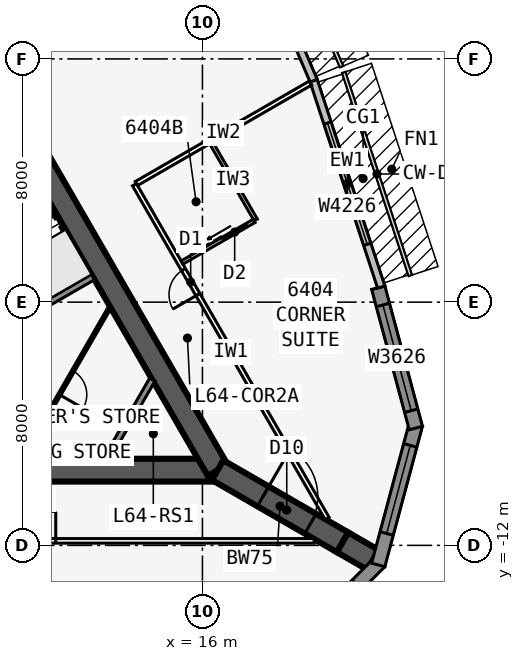
"""IFC4 building model, lengths in metres.
Left out: names, types, materials, properties, quantities, classifications, styles, units other than length and angle.
Written with IfcOpenShell. Run it as: python <this file> out.ifc"""

import sys

from ifc_helpers import new_model, si_unit, direction, frame, frame_2d, origin, place, context, subcontext, project, spatial, polyline, rectangle, outline, extrude, element, fill, save


model = new_model("IFC4")
c1 = context("Model", 3, precision=1e-05, world=origin(), true_north=direction((0.0, 1.0)))
c2 = subcontext(c1, "Body", "Model", "MODEL_VIEW")
j1 = project(units=[si_unit("LENGTHUNIT", "METRE"), si_unit("PLANEANGLEUNIT", "RADIAN")], contexts=[c1])
p1 = place(None, origin())
s1 = spatial("IfcSite", under=j1, at=p1, CompositionType="ELEMENT")
p2 = place(p1, origin())
s2 = spatial("IfcBuilding", under=s1, at=p2, CompositionType="ELEMENT")
p3 = place(p2, frame((0.0, 0.0, 242.9)))
s3 = spatial("IfcBuildingStorey", under=s2, at=p3, CompositionType="ELEMENT", Elevation=242.9)
p4 = place(p3, frame((-16.5, -9.526, 0.0), z_axis=(0.0, 0.0, 1.0), x_axis=(1.0, 0.0, 0.0)))
e1 = element("IfcWall", 1, at=p4, inside=s3, PredefinedType="SHEAR", context=c2, shape_type="SweptSolid", body=[
    extrude(rectangle(XDim=33.0, YDim=0.75, at=frame_2d((16.5, 0.0))), origin(), (0.0, 0.0, 1.0), 3.6),
])
p5 = place(p4, frame((14.05, 0.0, 0.0)))
e2 = element("IfcOpeningElement", 2, at=p5, cuts=e1, PredefinedType="OPENING", context=c2, shape_type="SweptSolid", body=[
    extrude(rectangle(XDim=1.8, YDim=2.13, at=frame_2d((0.9, 1.065))), frame((0.0, 0.385, 0.0), z_axis=(0.0, -1.0, 0.0), x_axis=(1.0, 0.0, 0.0)), (0.0, 0.0, 1.0), 0.77),
])
p6 = place(p3, frame((16.5, -9.526, 0.0), z_axis=(0.0, 0.0, 1.0), x_axis=(-0.499999749417, 0.866025548458, 0.0)))
e3 = element("IfcWall", 3, at=p6, inside=s3, PredefinedType="SHEAR", context=c2, shape_type="SweptSolid", body=[
    extrude(rectangle(XDim=33.0, YDim=0.75, at=frame_2d((16.5, 0.0))), origin(), (0.0, 0.0, 1.0), 3.6),
])
p7 = place(p6, frame((14.15, 0.0, 0.0)))
e4 = element("IfcOpeningElement", 4, at=p7, cuts=e3, PredefinedType="OPENING", context=c2, shape_type="SweptSolid", body=[
    extrude(rectangle(XDim=1.8, YDim=2.13, at=frame_2d((0.9, 1.065))), frame((0.0, 0.385, 0.0), z_axis=(0.0, -1.0, 0.0), x_axis=(1.0, 0.0, 0.0)), (0.0, 0.0, 1.0), 0.77),
])
p8 = place(p6, frame((12.6, 0.0, 0.0)))
e5 = element("IfcOpeningElement", 5, at=p8, cuts=e3, PredefinedType="OPENING", context=c2, shape_type="SweptSolid", body=[
    extrude(rectangle(XDim=1.0, YDim=2.13, at=frame_2d((0.5, 1.065))), frame((0.0, 0.385, 0.0), z_axis=(0.0, -1.0, 0.0), x_axis=(1.0, 0.0, 0.0)), (0.0, 0.0, 1.0), 0.77),
])
p9 = place(p3, frame((9.629, -4.775, 0.0), z_axis=(0.0, 0.0, 1.0), x_axis=(0.866008981251, 0.500028443584, 0.0)))
e6 = element("IfcWall", 6, at=p9, inside=s3, PredefinedType="SOLIDWALL", context=c2, shape_type="SweptSolid", body=[
    extrude(rectangle(XDim=3.2, YDim=0.2, at=frame_2d((1.6, 0.0))), origin(), (0.0, 0.0, 1.0), 3.435),
])
p10 = place(p3, frame((16.5, -9.526, 0.0), z_axis=(0.0, 0.0, 1.0), x_axis=(0.866031398331, -0.499989616998, 0.0)))
e7 = element("IfcWall", 7, at=p10, inside=s3, PredefinedType="SHEAR", context=c2, shape_type="SweptSolid", body=[
    extrude(rectangle(XDim=4.746, YDim=0.75, at=frame_2d((2.373, 0.0))), origin(), (0.0, 0.0, 1.0), 3.6),
])
p11 = place(p10, frame((1.725, 0.0, 0.0)))
e8 = element("IfcOpeningElement", 8, at=p11, cuts=e7, PredefinedType="OPENING", context=c2, shape_type="SweptSolid", body=[
    extrude(rectangle(XDim=1.8, YDim=2.13, at=frame_2d((0.9, 1.065))), frame((0.0, 0.385, 0.0), z_axis=(0.0, -1.0, 0.0), x_axis=(1.0, 0.0, 0.0)), (0.0, 0.0, 1.0), 0.77),
])
p12 = place(p3, frame((20.61, -11.899, 0.0), z_axis=(0.0, 0.0, 1.0), x_axis=(0.866009537788, -0.500027479704, 0.0)))
e9 = element("IfcWall", 9, at=p12, inside=s3, PredefinedType="SHEAR", context=c2, shape_type="SweptSolid", body=[
    extrude(rectangle(XDim=1.155, YDim=0.75, at=frame_2d((0.577, 0.0))), origin(), (0.0, 0.0, 1.0), 3.6),
])
p13 = place(p3, frame((18.46, -15.924, 0.0), z_axis=(0.0, 0.0, 1.0), x_axis=(0.707081252484, 0.707132308968, 0.0)))
e10 = element("IfcWall", 10, at=p13, inside=s3, PredefinedType="SOLIDWALL", context=c2, shape_type="SweptSolid", body=[
    extrude(outline(polyline([(4.782, 0.225), (4.723, 0.225), (4.303, 0.113), (4.273, 0.225), (0.0, 0.225), (0.0, -0.225), (4.782, -0.225), (4.782, 0.225)])), origin(), (0.0, 0.0, 1.0), 3.435),
])
p14 = place(p13, frame((0.711, 0.0, 0.45)))
e11 = element("IfcOpeningElement", 11, at=p14, cuts=e10, PredefinedType="OPENING", context=c2, shape_type="SweptSolid", body=[
    extrude(rectangle(XDim=3.0, YDim=2.6, at=frame_2d((1.5, 1.3))), frame((0.0, 0.235, 0.0), z_axis=(0.0, -1.0, 0.0), x_axis=(1.0, 0.0, 0.0)), (0.0, 0.0, 1.0), 0.47),
])
p15 = place(p3, frame((21.783, -12.644, 0.0), z_axis=(0.0, 0.0, 1.0), x_axis=(0.25880328844, 0.965930048136, 0.0)))
e12 = element("IfcWall", 12, at=p15, inside=s3, PredefinedType="SOLIDWALL", context=c2, shape_type="SweptSolid", body=[
    extrude(outline(polyline([(4.782, 0.225), (0.509, 0.225), (0.479, 0.113), (0.06, 0.225), (0.0, 0.225), (0.0, -0.225), (4.782, -0.225), (4.782, 0.225)])), origin(), (0.0, 0.0, 1.0), 3.435),
])
p16 = place(p15, frame((1.07, 0.0, 0.45)))
e13 = element("IfcOpeningElement", 13, at=p16, cuts=e12, PredefinedType="OPENING", context=c2, shape_type="SweptSolid", body=[
    extrude(rectangle(XDim=3.0, YDim=2.6, at=frame_2d((1.5, 1.3))), frame((0.0, 0.235, 0.0), z_axis=(0.0, -1.0, 0.0), x_axis=(1.0, 0.0, 0.0)), (0.0, 0.0, 1.0), 0.47),
])
p17 = place(p3, frame((23.02, -8.141, 0.0), z_axis=(0.0, 0.0, 1.0), x_axis=(-0.25880328844, 0.965930048136, 0.0)))
e14 = element("IfcWall", 14, at=p17, inside=s3, PredefinedType="SOLIDWALL", context=c2, shape_type="SweptSolid", body=[
    extrude(rectangle(XDim=4.782, YDim=0.45, at=frame_2d((2.391, 0.0))), origin(), (0.0, 0.0, 1.0), 3.435),
])
p18 = place(p17, frame((0.591, 0.0, 0.45)))
e15 = element("IfcOpeningElement", 15, at=p18, cuts=e14, PredefinedType="OPENING", context=c2, shape_type="SweptSolid", body=[
    extrude(rectangle(XDim=3.6, YDim=2.6, at=frame_2d((1.8, 1.3))), frame((0.0, 0.235, 0.0), z_axis=(0.0, -1.0, 0.0), x_axis=(1.0, 0.0, 0.0)), (0.0, 0.0, 1.0), 0.47),
])
p19 = place(p3, frame((21.881, -3.503, 0.0), z_axis=(0.0, 0.0, 1.0), x_axis=(-0.311328857048, 0.95030223759, 0.0)))
e16 = element("IfcWall", 16, at=p19, inside=s3, PredefinedType="STANDARD", context=c2, shape_type="SweptSolid", body=[
    extrude(rectangle(XDim=7.153, YDim=0.25, at=frame_2d((3.576, 0.0))), origin(), (0.0, 0.0, 1.0), 3.435),
])
p20 = place(p19, frame((1.476, 0.0, 0.45)))
e17 = element("IfcOpeningElement", 17, at=p20, cuts=e16, PredefinedType="OPENING", context=c2, shape_type="SweptSolid", body=[
    extrude(rectangle(XDim=4.2, YDim=2.6, at=frame_2d((2.1, 1.3))), frame((0.0, 0.135, 0.0), z_axis=(0.0, -1.0, 0.0), x_axis=(1.0, 0.0, 0.0)), (0.0, 0.0, 1.0), 0.27),
])
p21 = place(p3, frame((19.658, 3.284, 0.0), z_axis=(0.0, 0.0, 1.0), x_axis=(-0.393290226175, 0.91941437774, 0.0)))
e18 = element("IfcWall", 18, at=p21, inside=s3, PredefinedType="STANDARD", context=c2, shape_type="SweptSolid", body=[
    extrude(rectangle(XDim=2.014, YDim=0.25, at=frame_2d((1.007, 0.0))), origin(), (0.0, 0.0, 1.0), 3.435),
])
p22 = place(p3, frame((-19.677, -11.851, 0.0), z_axis=(0.0, 0.0, 1.0), x_axis=(1.0, 0.0, 0.0)))
e19 = element("IfcWall", 19, at=p22, inside=s3, PredefinedType="PARTITIONING", context=c2, shape_type="SweptSolid", body=[
    extrude(rectangle(XDim=39.354, YDim=0.15, at=frame_2d((19.677, 0.0))), origin(), (0.0, 0.0, 1.0), 3.435),
])
p23 = place(p22, frame((8.502, 0.0, 0.0)))
e20 = element("IfcOpeningElement", 20, at=p23, cuts=e19, PredefinedType="OPENING", context=c2, shape_type="SweptSolid", body=[
    extrude(rectangle(XDim=0.95, YDim=2.13, at=frame_2d((0.475, 1.065))), frame((0.0, 0.085, 0.0), z_axis=(0.0, -1.0, 0.0), x_axis=(1.0, 0.0, 0.0)), (0.0, 0.0, 1.0), 0.17),
])
p24 = place(p22, frame((15.677, 0.0, 0.0)))
e21 = element("IfcOpeningElement", 21, at=p24, cuts=e19, PredefinedType="OPENING", context=c2, shape_type="SweptSolid", body=[
    extrude(rectangle(XDim=1.0, YDim=2.13, at=frame_2d((0.5, 1.065))), frame((0.0, 0.085, 0.0), z_axis=(0.0, -1.0, 0.0), x_axis=(1.0, 0.0, 0.0)), (0.0, 0.0, 1.0), 0.17),
])
p25 = place(p22, frame((22.902, 0.0, 0.0)))
e22 = element("IfcOpeningElement", 22, at=p25, cuts=e19, PredefinedType="OPENING", context=c2, shape_type="SweptSolid", body=[
    extrude(rectangle(XDim=0.95, YDim=2.13, at=frame_2d((0.475, 1.065))), frame((0.0, 0.085, 0.0), z_axis=(0.0, -1.0, 0.0), x_axis=(1.0, 0.0, 0.0)), (0.0, 0.0, 1.0), 0.17),
])
p26 = place(p22, frame((29.902, 0.0, 0.0)))
e23 = element("IfcOpeningElement", 23, at=p26, cuts=e19, PredefinedType="OPENING", context=c2, shape_type="SweptSolid", body=[
    extrude(rectangle(XDim=0.95, YDim=2.13, at=frame_2d((0.475, 1.065))), frame((0.0, 0.085, 0.0), z_axis=(0.0, -1.0, 0.0), x_axis=(1.0, 0.0, 0.0)), (0.0, 0.0, 1.0), 0.17),
])
p27 = place(p3, frame((20.102, -11.115, 0.0), z_axis=(0.0, 0.0, 1.0), x_axis=(-0.500001960654, 0.866024271797, 0.0)))
e24 = element("IfcWall", 24, at=p27, inside=s3, PredefinedType="PARTITIONING", context=c2, shape_type="SweptSolid", body=[
    extrude(rectangle(XDim=12.677, YDim=0.15, at=frame_2d((6.339, 0.0))), origin(), (0.0, 0.0, 1.0), 3.435),
])
p28 = place(p27, frame((8.502, 0.0, 0.0)))
e25 = element("IfcOpeningElement", 25, at=p28, cuts=e24, PredefinedType="OPENING", context=c2, shape_type="SweptSolid", body=[
    extrude(rectangle(XDim=0.95, YDim=2.13, at=frame_2d((0.475, 1.065))), frame((0.0, 0.085, 0.0), z_axis=(0.0, -1.0, 0.0), x_axis=(1.0, 0.0, 0.0)), (0.0, 0.0, 1.0), 0.17),
])
p29 = place(p3, frame((13.829, -0.099, 0.0), z_axis=(0.0, 0.0, 1.0), x_axis=(0.866022562216, 0.500004921708, 0.0)))
e26 = element("IfcWall", 26, at=p29, inside=s3, PredefinedType="PARTITIONING", context=c2, shape_type="SweptSolid", body=[
    extrude(rectangle(XDim=6.609, YDim=0.15, at=frame_2d((3.304, 0.0))), origin(), (0.0, 0.0, 1.0), 2.678),
])
p30 = place(p3, frame((17.753, -1.297, 0.0), z_axis=(0.0, 0.0, 1.0), x_axis=(-0.499990139034, 0.866031096941, 0.0)))
e27 = element("IfcWall", 27, at=p30, inside=s3, PredefinedType="PLUMBINGWALL", context=c2, shape_type="SweptSolid", body=[
    extrude(rectangle(XDim=3.0, YDim=0.12, at=frame_2d((1.5, 0.0))), origin(), (0.0, 0.0, 1.0), 3.435),
])
p31 = place(p3, frame((15.329, -2.697, 0.0), z_axis=(0.0, 0.0, 1.0), x_axis=(0.866035715982, 0.499982138324, 0.0)))
e28 = element("IfcWall", 28, at=p31, inside=s3, PredefinedType="PLUMBINGWALL", context=c2, shape_type="SweptSolid", body=[
    extrude(rectangle(XDim=2.74, YDim=0.12, at=frame_2d((1.37, 0.0))), origin(), (0.0, 0.0, 1.0), 3.435),
])
p32 = place(p31, frame((1.55, 0.0, 0.0)))
e29 = element("IfcOpeningElement", 29, at=p32, cuts=e28, PredefinedType="OPENING", context=c2, shape_type="SweptSolid", body=[
    extrude(rectangle(XDim=0.9, YDim=2.13, at=frame_2d((0.45, 1.065))), frame((0.0, 0.07, 0.0), z_axis=(0.0, -1.0, 0.0), x_axis=(1.0, 0.0, 0.0)), (0.0, 0.0, 1.0), 0.14),
])
p33 = place(p3, frame((14.349, -6.551, 0.0), z_axis=(0.0, 0.0, 1.0), x_axis=(-0.499952404951, -0.866052881055, 0.0)))
e30 = element("IfcWall", 30, at=p33, inside=s3, PredefinedType="SOLIDWALL", context=c2, shape_type="SweptSolid", body=[
    extrude(rectangle(XDim=3.002, YDim=0.2, at=frame_2d((1.501, 0.0))), origin(), (0.0, 0.0, 1.0), 3.435),
])
p34 = place(p3, frame((12.964, -4.151, 0.0), z_axis=(0.0, 0.0, 1.0), x_axis=(-0.500027479704, -0.866009537788, 0.0)))
e31 = element("IfcWall", 31, at=p34, inside=s3, PredefinedType="PARTITIONING", context=c2, shape_type="SweptSolid", body=[
    extrude(rectangle(XDim=5.774, YDim=0.1, at=frame_2d((2.887, 0.0))), origin(), (0.0, 0.0, 1.0), 3.435),
])
p35 = place(p34, frame((2.437, 0.0, 0.0)))
e32 = element("IfcOpeningElement", 32, at=p35, cuts=e31, PredefinedType="OPENING", context=c2, shape_type="SweptSolid", body=[
    extrude(rectangle(XDim=0.9, YDim=2.13, at=frame_2d((0.45, 1.065))), frame((0.0, 0.06, 0.0), z_axis=(0.0, -1.0, 0.0), x_axis=(1.0, 0.0, 0.0)), (0.0, 0.0, 1.0), 0.12),
])
p36 = place(p16, origin())
e33 = element("IfcWindow", 33, at=p36, inside=s3, PartitioningType="SINGLE_PANEL", PredefinedType="WINDOW", context=c2, shape_type="SweptSolid", body=[
    extrude(rectangle(XDim=3.0, YDim=2.6, at=frame_2d((1.5, 1.3))), frame((0.0, 0.03, 0.0), z_axis=(0.0, -1.0, 0.0), x_axis=(1.0, 0.0, 0.0)), (0.0, 0.0, 1.0), 0.06),
])
fill(e13, e33)
p37 = place(p18, origin())
e34 = element("IfcWindow", 34, at=p37, inside=s3, PartitioningType="SINGLE_PANEL", PredefinedType="WINDOW", context=c2, shape_type="SweptSolid", body=[
    extrude(rectangle(XDim=3.6, YDim=2.6, at=frame_2d((1.8, 1.3))), frame((0.0, 0.03, 0.0), z_axis=(0.0, -1.0, 0.0), x_axis=(1.0, 0.0, 0.0)), (0.0, 0.0, 1.0), 0.06),
])
fill(e15, e34)
p38 = place(p20, origin())
e35 = element("IfcWindow", 35, at=p38, inside=s3, PartitioningType="SINGLE_PANEL", PredefinedType="WINDOW", context=c2, shape_type="SweptSolid", body=[
    extrude(rectangle(XDim=4.2, YDim=2.6, at=frame_2d((2.1, 1.3))), frame((0.0, 0.03, 0.0), z_axis=(0.0, -1.0, 0.0), x_axis=(1.0, 0.0, 0.0)), (0.0, 0.0, 1.0), 0.06),
])
fill(e17, e35)
p39 = place(p26, origin())
e36 = element("IfcDoor", 36, at=p39, inside=s3, OperationType="SINGLE_SWING_RIGHT", PredefinedType="DOOR", context=c2, shape_type="SweptSolid", body=[
    extrude(rectangle(XDim=0.95, YDim=2.13, at=frame_2d((0.475, 1.065))), frame((0.0, 0.025, 0.0), z_axis=(0.0, -1.0, 0.0), x_axis=(1.0, 0.0, 0.0)), (0.0, 0.0, 1.0), 0.05),
])
fill(e23, e36)
p40 = place(p32, origin())
e37 = element("IfcDoor", 37, at=p40, inside=s3, OperationType="SLIDING_TO_LEFT", PredefinedType="DOOR", context=c2, shape_type="SweptSolid", body=[
    extrude(rectangle(XDim=0.9, YDim=2.13, at=frame_2d((0.45, 1.065))), frame((0.0, 0.025, 0.0), z_axis=(0.0, -1.0, 0.0), x_axis=(1.0, 0.0, 0.0)), (0.0, 0.0, 1.0), 0.05),
])
fill(e29, e37)
p41 = place(p28, origin())
e38 = element("IfcDoor", 38, at=p41, inside=s3, OperationType="SINGLE_SWING_LEFT", PredefinedType="DOOR", context=c2, shape_type="SweptSolid", body=[
    extrude(rectangle(XDim=0.95, YDim=2.13, at=frame_2d((0.475, 1.065))), frame((0.0, 0.025, 0.0), z_axis=(0.0, -1.0, 0.0), x_axis=(1.0, 0.0, 0.0)), (0.0, 0.0, 1.0), 0.05),
])
fill(e25, e38)
p42 = place(p11, origin())
e39 = element("IfcDoor", 39, at=p42, inside=s3, OperationType="DOUBLE_DOOR_DOUBLE_SWING", PredefinedType="DOOR", context=c2, shape_type="SweptSolid", body=[
    extrude(rectangle(XDim=1.8, YDim=2.13, at=frame_2d((0.9, 1.065))), frame((0.0, 0.025, 0.0), z_axis=(0.0, -1.0, 0.0), x_axis=(1.0, 0.0, 0.0)), (0.0, 0.0, 1.0), 0.05),
])
fill(e8, e39)
p43 = place(p35, origin())
e40 = element("IfcDoor", 40, at=p43, inside=s3, OperationType="SINGLE_SWING_RIGHT", PredefinedType="DOOR", context=c2, shape_type="SweptSolid", body=[
    extrude(rectangle(XDim=0.9, YDim=2.13, at=frame_2d((0.45, 1.065))), frame((0.0, 0.025, 0.0), z_axis=(0.0, -1.0, 0.0), x_axis=(1.0, 0.0, 0.0)), (0.0, 0.0, 1.0), 0.05),
])
fill(e32, e40)
save(model, sys.argv[1])
